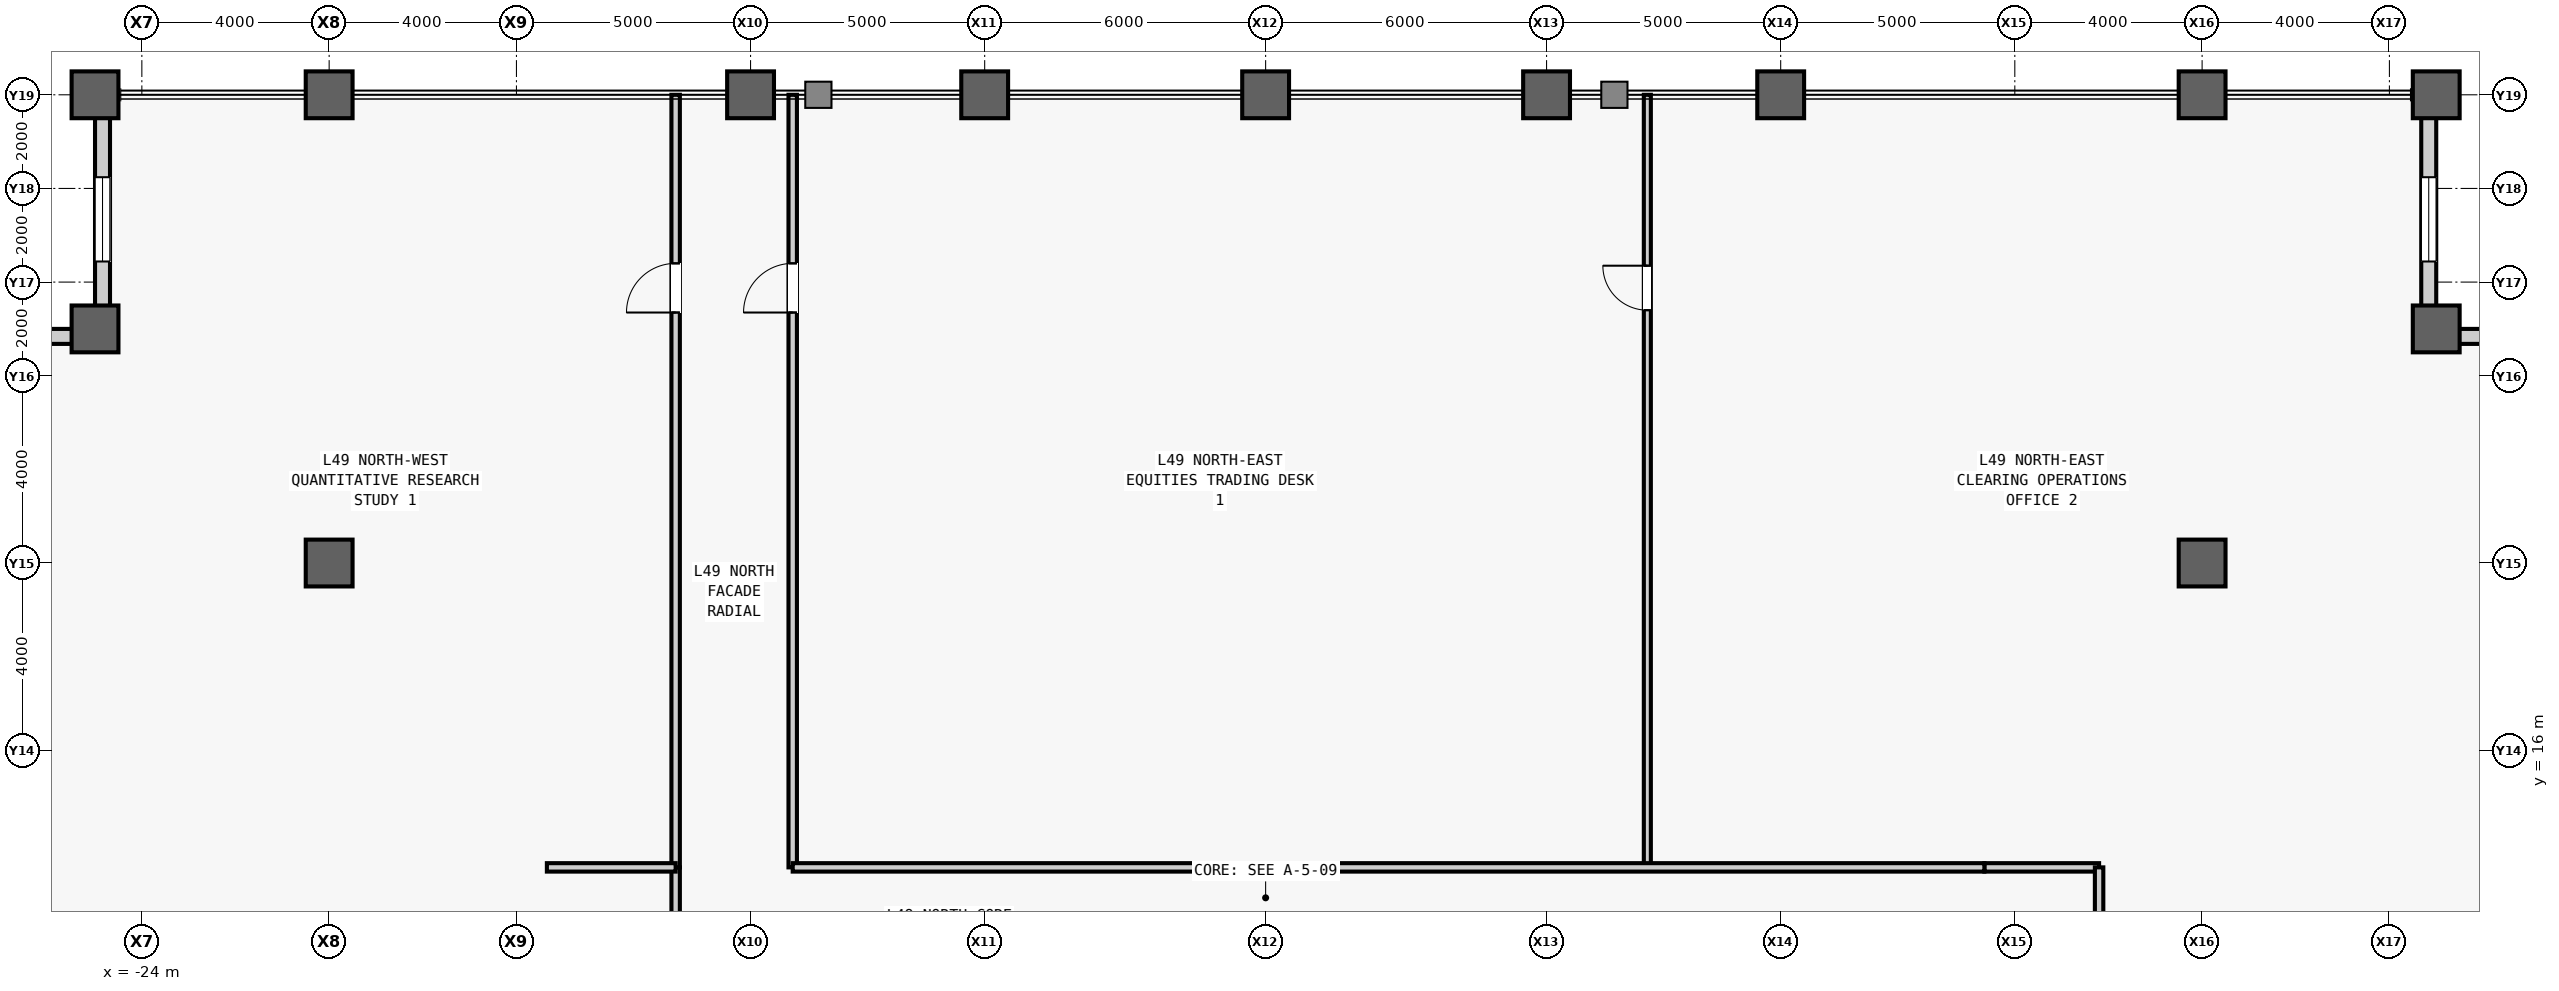
"""IFC4 building model, lengths in metres.
Left out: names, types, materials, properties, quantities, classifications, styles, units other than length and angle.
Written with IfcOpenShell. Run it as: python <this file> out.ifc"""

import sys

from ifc_helpers import new_model, si_unit, direction, frame, frame_2d, origin, origin_2d, place, context, subcontext, project, spatial, rectangle, hollow_rectangle, extrude, source, transform, mapped, element, fill, save


model = new_model("IFC4")
c1 = context("Model", 3, precision=1e-05, world=origin(), true_north=direction((0.0, 1.0)))
c2 = subcontext(c1, "Body", "Model", "MODEL_VIEW")
j1 = project(units=[si_unit("LENGTHUNIT", "METRE"), si_unit("PLANEANGLEUNIT", "RADIAN")], contexts=[c1])
p1 = place(None, origin())
s1 = spatial("IfcSite", under=j1, at=p1, CompositionType="ELEMENT")
p2 = place(p1, origin())
s2 = spatial("IfcBuilding", under=s1, at=p2, CompositionType="ELEMENT")
p3 = place(p2, frame((0.0, 0.0, 211.1)))
s3 = spatial("IfcBuildingStorey", under=s2, at=p3, CompositionType="ELEMENT", Elevation=211.1)
m1 = source(origin(), c2, "Body", "SweptSolid", [
    extrude(hollow_rectangle(XDim=1.0, YDim=1.0, WallThickness=0.055, at=origin_2d()), origin(), (0.0, 0.0, 1.0), 4.0),
])
for number, where, z_axis, x_axis in (
    (1, (-25.0, 25.0, 0.0), (0.0, 0.0, 1.0), (1.0, 0.0, 0.0)),
    (2, (-25.0, 30.0, 0.0), (0.0, 0.0, 1.0), (1.0, 0.0, 0.0)),
    (3, (-20.0, 20.0, 0.0), (0.0, 0.0, 1.0), (1.0, 0.0, 0.0)),
    (4, (-20.0, 30.0, 0.0), (0.0, 0.0, 1.0), (1.0, 0.0, 0.0)),
    (5, (-11.0, 30.0, 0.0), (0.0, 0.0, 1.0), (1.0, 0.0, 0.0)),
    (6, (-6.0, 30.0, 0.0), (0.0, 0.0, 1.0), (1.0, 0.0, 0.0)),
    (7, (0.0, 30.0, 0.0), (0.0, 0.0, 1.0), (1.0, 0.0, 0.0)),
    (8, (6.0, 30.0, 0.0), (0.0, 0.0, 1.0), (1.0, 0.0, 0.0)),
    (9, (11.0, 30.0, 0.0), (0.0, 0.0, 1.0), (1.0, 0.0, 0.0)),
    (10, (20.0, 20.0, 0.0), (0.0, 0.0, 1.0), (1.0, 0.0, 0.0)),
    (11, (20.0, 30.0, 0.0), (0.0, 0.0, 1.0), (1.0, 0.0, 0.0)),
    (12, (25.0, 25.0, 0.0), (0.0, 0.0, 1.0), (1.0, 0.0, 0.0)),
    (13, (25.0, 30.0, 0.0), (0.0, 0.0, 1.0), (1.0, 0.0, 0.0)),
):
    element("IfcColumn", number, at=place(p3, frame(where, z_axis=z_axis, x_axis=x_axis)), inside=s3, PredefinedType="COLUMN", context=c2, shape_type="MappedRepresentation", body=[
        mapped(m1, transform((0.0, 0.0, 0.0), scale=1.0)),
    ])
m2 = source(origin(), c2, "Body", "SweptSolid", [
    extrude(rectangle(XDim=4.68, YDim=0.32, at=frame_2d((2.34, 0.0))), origin(), (0.0, 0.0, 1.0), 3.164),
])
p4 = place(p3, frame((25.0, 24.84, 0.0), z_axis=(0.0, 0.0, 1.0), x_axis=(1.0, 0.0, 0.0)))
e14 = element("IfcWall", 14, at=p4, inside=s3, PredefinedType="STANDARD", context=c2, shape_type="MappedRepresentation", body=[
    mapped(m2, transform((0.0, 0.0, 0.0), scale=1.0)),
])
m3 = source(origin(), c2, "Body", "SweptSolid", [
    extrude(rectangle(XDim=1.8, YDim=2.4, at=frame_2d((0.9, 1.2))), frame((0.0, 0.17, 0.0), z_axis=(0.0, -1.0, 0.0), x_axis=(1.0, 0.0, 0.0)), (0.0, 0.0, 1.0), 0.34),
])
p5 = place(p4, frame((1.44, 0.0, 0.5)))
e15 = element("IfcOpeningElement", 15, at=p5, cuts=e14, PredefinedType="OPENING", context=c2, shape_type="MappedRepresentation", body=[
    mapped(m3, transform((0.0, 0.0, 0.0), scale=1.0)),
])
p6 = place(p3, frame((24.84, 25.0, 0.0), z_axis=(0.0, 0.0, 1.0), x_axis=(0.0, 1.0, 0.0)))
e16 = element("IfcWall", 16, at=p6, inside=s3, PredefinedType="STANDARD", context=c2, shape_type="MappedRepresentation", body=[
    mapped(m2, transform((0.0, 0.0, 0.0), scale=1.0)),
])
p7 = place(p6, frame((1.44, 0.0, 0.5)))
e17 = element("IfcOpeningElement", 17, at=p7, cuts=e16, PredefinedType="OPENING", context=c2, shape_type="MappedRepresentation", body=[
    mapped(m3, transform((0.0, 0.0, 0.0), scale=1.0)),
])
p8 = place(p3, frame((-24.84, 25.0, 0.0), z_axis=(0.0, 0.0, 1.0), x_axis=(0.0, 1.0, 0.0)))
e18 = element("IfcWall", 18, at=p8, inside=s3, PredefinedType="STANDARD", context=c2, shape_type="MappedRepresentation", body=[
    mapped(m2, transform((0.0, 0.0, 0.0), scale=1.0)),
])
p9 = place(p8, frame((1.44, 0.0, 0.5)))
e19 = element("IfcOpeningElement", 19, at=p9, cuts=e18, PredefinedType="OPENING", context=c2, shape_type="MappedRepresentation", body=[
    mapped(m3, transform((0.0, 0.0, 0.0), scale=1.0)),
])
p10 = place(p3, frame((-25.0, 24.84, 0.0), z_axis=(0.0, 0.0, 1.0), x_axis=(-1.0, 0.0, 0.0)))
e20 = element("IfcWall", 20, at=p10, inside=s3, PredefinedType="STANDARD", context=c2, shape_type="MappedRepresentation", body=[
    mapped(m2, transform((0.0, 0.0, 0.0), scale=1.0)),
])
p11 = place(p10, frame((1.44, 0.0, 0.5)))
e21 = element("IfcOpeningElement", 21, at=p11, cuts=e20, PredefinedType="OPENING", context=c2, shape_type="MappedRepresentation", body=[
    mapped(m3, transform((0.0, 0.0, 0.0), scale=1.0)),
])
m4 = source(origin(), c2, "Body", "SweptSolid", [
    extrude(rectangle(XDim=2.45, YDim=0.18, at=frame_2d((1.225, 0.0))), origin(), (0.0, 0.0, 1.0), 3.78),
])
p12 = place(p3, frame((15.35, 13.5, 0.0), z_axis=(0.0, 0.0, 1.0), x_axis=(1.0, 0.0, 0.0)))
e22 = element("IfcWall", 22, at=p12, inside=s3, PredefinedType="PARTITIONING", context=c2, shape_type="MappedRepresentation", body=[
    mapped(m4, transform((0.0, 0.0, 0.0), scale=1.0)),
])
m5 = source(origin(), c2, "Body", "SweptSolid", [
    extrude(rectangle(XDim=2.5, YDim=0.18, at=frame_2d((1.25, 0.0))), origin(), (0.0, 0.0, 1.0), 3.78),
])
p13 = place(p3, frame((-12.6, 11.0, 0.0), z_axis=(0.0, 0.0, 1.0), x_axis=(0.0, 1.0, 0.0)))
e23 = element("IfcWall", 23, at=p13, inside=s3, PredefinedType="PARTITIONING", context=c2, shape_type="MappedRepresentation", body=[
    mapped(m5, transform((0.0, 0.0, 0.0), scale=1.0)),
])
m6 = source(origin(), c2, "Body", "SweptSolid", [
    extrude(rectangle(XDim=16.5, YDim=0.18, at=frame_2d((8.25, 0.0))), origin(), (0.0, 0.0, 1.0), 3.78),
])
p14 = place(p3, frame((-12.6, 13.5, 0.0), z_axis=(0.0, 0.0, 1.0), x_axis=(0.0, 1.0, 0.0)))
e24 = element("IfcWall", 24, at=p14, inside=s3, PredefinedType="PARTITIONING", context=c2, shape_type="MappedRepresentation", body=[
    mapped(m6, transform((0.0, 0.0, 0.0), scale=1.0)),
])
m7 = source(origin(), c2, "Body", "SweptSolid", [
    extrude(rectangle(XDim=1.05, YDim=2.2, at=frame_2d((0.525, 1.1))), frame((0.0, 0.1, 0.0), z_axis=(0.0, -1.0, 0.0), x_axis=(1.0, 0.0, 0.0)), (0.0, 0.0, 1.0), 0.2),
])
p15 = place(p14, frame((11.85, 0.0, 0.0)))
e25 = element("IfcOpeningElement", 25, at=p15, cuts=e24, PredefinedType="OPENING", context=c2, shape_type="MappedRepresentation", body=[
    mapped(m7, transform((0.0, 0.0, 0.0), scale=1.0)),
])
m8 = source(origin(), c2, "Body", "SweptSolid", [
    extrude(rectangle(XDim=2.75, YDim=0.18, at=frame_2d((1.375, 0.0))), origin(), (0.0, 0.0, 1.0), 3.78),
])
p16 = place(p3, frame((-15.35, 13.5, 0.0), z_axis=(0.0, 0.0, 1.0), x_axis=(1.0, 0.0, 0.0)))
e26 = element("IfcWall", 26, at=p16, inside=s3, PredefinedType="PARTITIONING", context=c2, shape_type="MappedRepresentation", body=[
    mapped(m8, transform((0.0, 0.0, 0.0), scale=1.0)),
])
m9 = source(origin(), c2, "Body", "SweptSolid", [
    extrude(rectangle(XDim=16.5, YDim=0.15, at=frame_2d((8.25, 0.0))), origin(), (0.0, 0.0, 1.0), 3.78),
])
p17 = place(p3, frame((8.152, 13.5, 0.0), z_axis=(0.0, 0.0, 1.0), x_axis=(0.0, 1.0, 0.0)))
e27 = element("IfcWall", 27, at=p17, inside=s3, PredefinedType="PARTITIONING", context=c2, shape_type="MappedRepresentation", body=[
    mapped(m9, transform((0.0, 0.0, 0.0), scale=1.0)),
])
m10 = source(origin(), c2, "Body", "SweptSolid", [
    extrude(rectangle(XDim=0.95, YDim=2.15, at=frame_2d((0.475, 1.075))), frame((0.0, 0.085, 0.0), z_axis=(0.0, -1.0, 0.0), x_axis=(1.0, 0.0, 0.0)), (0.0, 0.0, 1.0), 0.17),
])
p18 = place(p17, frame((11.9, 0.0, 0.0)))
e28 = element("IfcOpeningElement", 28, at=p18, cuts=e27, PredefinedType="OPENING", context=c2, shape_type="MappedRepresentation", body=[
    mapped(m10, transform((0.0, 0.0, 0.0), scale=1.0)),
])
p19 = place(p3, frame((-10.1, 13.5, 0.0), z_axis=(0.0, 0.0, 1.0), x_axis=(0.0, 1.0, 0.0)))
e29 = element("IfcWall", 29, at=p19, inside=s3, PredefinedType="PARTITIONING", context=c2, shape_type="MappedRepresentation", body=[
    mapped(m6, transform((0.0, 0.0, 0.0), scale=1.0)),
])
p20 = place(p19, frame((11.85, 0.0, 0.0)))
e30 = element("IfcOpeningElement", 30, at=p20, cuts=e29, PredefinedType="OPENING", context=c2, shape_type="MappedRepresentation", body=[
    mapped(m7, transform((0.0, 0.0, 0.0), scale=1.0)),
])
m11 = source(origin(), c2, "Body", "SweptSolid", [
    extrude(rectangle(XDim=25.45, YDim=0.18, at=frame_2d((12.725, 0.0))), origin(), (0.0, 0.0, 1.0), 3.78),
])
p21 = place(p3, frame((-10.1, 13.5, 0.0), z_axis=(0.0, 0.0, 1.0), x_axis=(1.0, 0.0, 0.0)))
e31 = element("IfcWall", 31, at=p21, inside=s3, PredefinedType="PARTITIONING", context=c2, shape_type="MappedRepresentation", body=[
    mapped(m11, transform((0.0, 0.0, 0.0), scale=1.0)),
])
m12 = source(origin(), c2, "Body", "SweptSolid", [
    extrude(rectangle(XDim=10.45, YDim=0.18, at=frame_2d((5.225, 0.0))), origin(), (0.0, 0.0, 1.0), 3.78),
])
p22 = place(p3, frame((17.8, 3.05, 0.0), z_axis=(0.0, 0.0, 1.0), x_axis=(0.0, 1.0, 0.0)))
e32 = element("IfcWall", 32, at=p22, inside=s3, PredefinedType="PARTITIONING", context=c2, shape_type="MappedRepresentation", body=[
    mapped(m12, transform((0.0, 0.0, 0.0), scale=1.0)),
])
m13 = source(origin(), c2, "Body", "SweptSolid", [
    extrude(rectangle(XDim=1.8, YDim=2.4, at=frame_2d((0.9, 1.2))), frame((0.0, 0.03, 0.0), z_axis=(0.0, -1.0, 0.0), x_axis=(1.0, 0.0, 0.0)), (0.0, 0.0, 1.0), 0.06),
])
p23 = place(p7, origin())
e33 = element("IfcWindow", 33, at=p23, inside=s3, PartitioningType="SINGLE_PANEL", PredefinedType="WINDOW", context=c2, shape_type="MappedRepresentation", body=[
    mapped(m13, transform((0.0, 0.0, 0.0), scale=1.0)),
])
fill(e17, e33)
p24 = place(p9, origin())
e34 = element("IfcWindow", 34, at=p24, inside=s3, PartitioningType="SINGLE_PANEL", PredefinedType="WINDOW", context=c2, shape_type="MappedRepresentation", body=[
    mapped(m13, transform((0.0, 0.0, 0.0), scale=1.0)),
])
fill(e19, e34)
m14 = source(origin(), c2, "Body", "SweptSolid", [
    extrude(rectangle(XDim=1.05, YDim=2.2, at=frame_2d((0.525, 1.1))), frame((0.0, 0.025, 0.0), z_axis=(0.0, -1.0, 0.0), x_axis=(1.0, 0.0, 0.0)), (0.0, 0.0, 1.0), 0.05),
])
p25 = place(p15, origin())
e35 = element("IfcDoor", 35, at=p25, inside=s3, OperationType="SINGLE_SWING_LEFT", PredefinedType="DOOR", context=c2, shape_type="MappedRepresentation", body=[
    mapped(m14, transform((0.0, 0.0, 0.0), scale=1.0)),
])
fill(e25, e35)
m15 = source(origin(), c2, "Body", "SweptSolid", [
    extrude(rectangle(XDim=0.95, YDim=2.15, at=frame_2d((0.475, 1.075))), frame((0.0, 0.025, 0.0), z_axis=(0.0, -1.0, 0.0), x_axis=(1.0, 0.0, 0.0)), (0.0, 0.0, 1.0), 0.05),
])
p26 = place(p18, origin())
e36 = element("IfcDoor", 36, at=p26, inside=s3, OperationType="SINGLE_SWING_RIGHT", PredefinedType="DOOR", context=c2, shape_type="MappedRepresentation", body=[
    mapped(m15, transform((0.0, 0.0, 0.0), scale=1.0)),
])
fill(e28, e36)
p27 = place(p20, origin())
e37 = element("IfcDoor", 37, at=p27, inside=s3, OperationType="SINGLE_SWING_LEFT", PredefinedType="DOOR", context=c2, shape_type="MappedRepresentation", body=[
    mapped(m14, transform((0.0, 0.0, 0.0), scale=1.0)),
])
fill(e30, e37)
save(model, sys.argv[1])
